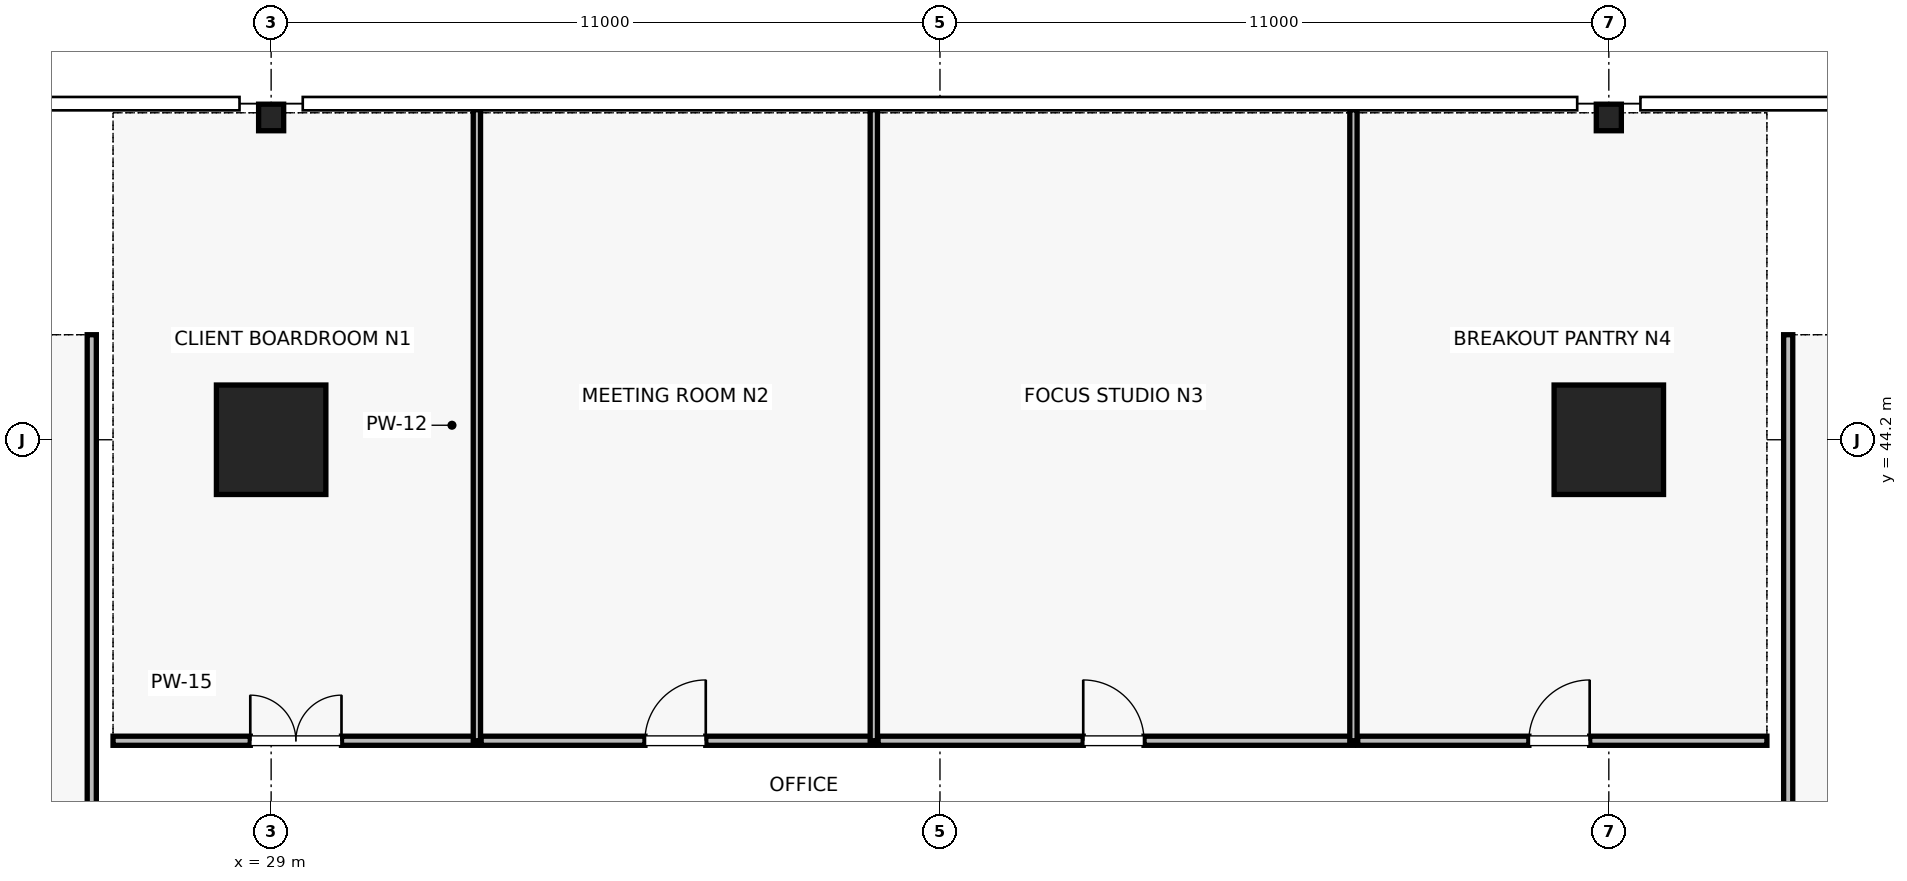
"""IFC4 building model, lengths in metres.
Left out: names, types, materials, properties, quantities, classifications, styles, units other than length and angle.
Written with IfcOpenShell. Run it as: python <this file> out.ifc"""

import sys

from ifc_helpers import new_model, si_unit, direction, frame, frame_2d, origin, origin_2d, place, context, subcontext, project, spatial, rectangle, i_section, extrude, element, fill, save


model = new_model("IFC4")
c1 = context("Model", 3, precision=1e-05, world=origin(), true_north=direction((0.0, 1.0)))
c2 = subcontext(c1, "Body", "Model", "MODEL_VIEW")
j1 = project(units=[si_unit("LENGTHUNIT", "METRE"), si_unit("PLANEANGLEUNIT", "RADIAN")], contexts=[c1])
p1 = place(None, origin())
s1 = spatial("IfcSite", under=j1, at=p1, CompositionType="ELEMENT")
p2 = place(p1, origin())
s2 = spatial("IfcBuilding", under=s1, at=p2, CompositionType="ELEMENT")
p3 = place(p2, frame((0.0, 0.0, 55.6)))
s3 = spatial("IfcBuildingStorey", under=s2, at=p3, CompositionType="ELEMENT", Elevation=55.6)
for number, where, z_axis, x_axis in (
    (1, (29.0, 44.2, 0.0), (0.0, 0.0, 1.0), (1.0, 0.0, 0.0)),
    (2, (51.0, 44.2, 0.0), (0.0, 0.0, 1.0), (1.0, 0.0, 0.0)),
):
    element("IfcColumn", number, at=place(p3, frame(where, z_axis=z_axis, x_axis=x_axis)), inside=s3, PredefinedType="COLUMN", context=c2, shape_type="SweptSolid", body=[
        extrude(rectangle(XDim=1.8, YDim=1.8, at=origin_2d()), origin(), (0.0, 0.0, 1.0), 4.0),
    ])
for number, where, z_axis, x_axis in (
    (3, (29.0, 49.5, 0.0), (0.0, 0.0, 1.0), (1.0, 0.0, 0.0)),
    (4, (51.0, 49.5, 0.0), (0.0, 0.0, 1.0), (1.0, 0.0, 0.0)),
):
    element("IfcColumn", number, at=place(p3, frame(where, z_axis=z_axis, x_axis=x_axis)), inside=s3, PredefinedType="COLUMN", context=c2, shape_type="SweptSolid", body=[
        extrude(i_section(OverallWidth=0.412, OverallDepth=0.437, WebThickness=0.036, FlangeThickness=0.058, FilletRadius=0.015, at=origin_2d()), origin(), (0.0, 0.0, 1.0), 4.0),
    ])
p4 = place(p3, frame((26.4, 39.25, 0.0), z_axis=(0.0, 0.0, 1.0), x_axis=(1.0, 0.0, 0.0)))
e5 = element("IfcWall", 5, at=p4, inside=s3, PredefinedType="PARTITIONING", context=c2, shape_type="SweptSolid", body=[
    extrude(rectangle(XDim=5.984, YDim=0.15, at=frame_2d((2.992, 0.0))), origin(), (0.0, 0.0, 1.0), 2.85),
])
p5 = place(p4, frame((2.257, 0.0, 0.0)))
e6 = element("IfcOpeningElement", 6, at=p5, cuts=e5, PredefinedType="OPENING", context=c2, shape_type="SweptSolid", body=[
    extrude(rectangle(XDim=1.5, YDim=2.25, at=frame_2d((0.75, 1.125))), frame((0.0, 0.075, 0.0), z_axis=(0.0, -1.0, 0.0), x_axis=(1.0, 0.0, 0.0)), (0.0, 0.0, 1.0), 0.15),
])
p6 = place(p3, frame((32.384, 39.25, 0.0), z_axis=(0.0, 0.0, 1.0), x_axis=(0.0, 1.0, 0.0)))
e7 = element("IfcWall", 7, at=p6, inside=s3, PredefinedType="PARTITIONING", context=c2, shape_type="SweptSolid", body=[
    extrude(rectangle(XDim=10.377, YDim=0.12, at=frame_2d((5.188, 0.0))), origin(), (0.0, 0.0, 1.0), 2.39),
])
p7 = place(p3, frame((32.454, 39.25, 0.0), z_axis=(0.0, 0.0, 1.0), x_axis=(1.0, 0.0, 0.0)))
e8 = element("IfcWall", 8, at=p7, inside=s3, PredefinedType="PARTITIONING", context=c2, shape_type="SweptSolid", body=[
    extrude(rectangle(XDim=6.458, YDim=0.15, at=frame_2d((3.229, 0.0))), origin(), (0.0, 0.0, 1.0), 2.85),
])
p8 = place(p7, frame((2.694, 0.0, 0.0)))
e9 = element("IfcOpeningElement", 9, at=p8, cuts=e8, PredefinedType="OPENING", context=c2, shape_type="SweptSolid", body=[
    extrude(rectangle(XDim=1.0, YDim=2.15, at=frame_2d((0.5, 1.075))), frame((0.0, 0.075, 0.0), z_axis=(0.0, -1.0, 0.0), x_axis=(1.0, 0.0, 0.0)), (0.0, 0.0, 1.0), 0.15),
])
p9 = place(p3, frame((38.912, 39.25, 0.0), z_axis=(0.0, 0.0, 1.0), x_axis=(0.0, 1.0, 0.0)))
e10 = element("IfcWall", 10, at=p9, inside=s3, PredefinedType="PARTITIONING", context=c2, shape_type="SweptSolid", body=[
    extrude(rectangle(XDim=10.377, YDim=0.12, at=frame_2d((5.188, 0.0))), origin(), (0.0, 0.0, 1.0), 2.39),
])
p10 = place(p3, frame((38.982, 39.25, 0.0), z_axis=(0.0, 0.0, 1.0), x_axis=(1.0, 0.0, 0.0)))
e11 = element("IfcWall", 11, at=p10, inside=s3, PredefinedType="PARTITIONING", context=c2, shape_type="SweptSolid", body=[
    extrude(rectangle(XDim=7.818, YDim=0.15, at=frame_2d((3.909, 0.0))), origin(), (0.0, 0.0, 1.0), 2.85),
])
p11 = place(p10, frame((3.374, 0.0, 0.0)))
e12 = element("IfcOpeningElement", 12, at=p11, cuts=e11, PredefinedType="OPENING", context=c2, shape_type="SweptSolid", body=[
    extrude(rectangle(XDim=1.0, YDim=2.15, at=frame_2d((0.5, 1.075))), frame((0.0, 0.075, 0.0), z_axis=(0.0, -1.0, 0.0), x_axis=(1.0, 0.0, 0.0)), (0.0, 0.0, 1.0), 0.15),
])
p12 = place(p3, frame((46.8, 39.25, 0.0), z_axis=(0.0, 0.0, 1.0), x_axis=(0.0, 1.0, 0.0)))
e13 = element("IfcWall", 13, at=p12, inside=s3, PredefinedType="PARTITIONING", context=c2, shape_type="SweptSolid", body=[
    extrude(rectangle(XDim=10.377, YDim=0.12, at=frame_2d((5.188, 0.0))), origin(), (0.0, 0.0, 1.0), 2.39),
])
p13 = place(p3, frame((46.87, 39.25, 0.0), z_axis=(0.0, 0.0, 1.0), x_axis=(1.0, 0.0, 0.0)))
e14 = element("IfcWall", 14, at=p13, inside=s3, PredefinedType="PARTITIONING", context=c2, shape_type="SweptSolid", body=[
    extrude(rectangle(XDim=6.73, YDim=0.15, at=frame_2d((3.365, 0.0))), origin(), (0.0, 0.0, 1.0), 2.85),
])
p14 = place(p13, frame((2.815, 0.0, 0.0)))
e15 = element("IfcOpeningElement", 15, at=p14, cuts=e14, PredefinedType="OPENING", context=c2, shape_type="SweptSolid", body=[
    extrude(rectangle(XDim=1.0, YDim=2.15, at=frame_2d((0.5, 1.075))), frame((0.0, 0.075, 0.0), z_axis=(0.0, -1.0, 0.0), x_axis=(1.0, 0.0, 0.0)), (0.0, 0.0, 1.0), 0.15),
])
p15 = place(p3, frame((26.05, 30.518, 0.0), z_axis=(0.0, 0.0, 1.0), x_axis=(0.0, 1.0, 0.0)))
e16 = element("IfcWall", 16, at=p15, inside=s3, PredefinedType="PARTITIONING", context=c2, shape_type="SweptSolid", body=[
    extrude(rectangle(XDim=15.409, YDim=0.15, at=frame_2d((7.705, 0.0))), origin(), (0.0, 0.0, 1.0), 2.85),
])
p16 = place(p15, frame((2.416, 0.0, 0.0)))
e17 = element("IfcOpeningElement", 17, at=p16, cuts=e16, PredefinedType="OPENING", context=c2, shape_type="SweptSolid", body=[
    extrude(rectangle(XDim=1.05, YDim=2.2, at=frame_2d((0.525, 1.1))), frame((0.0, 0.075, 0.0), z_axis=(0.0, -1.0, 0.0), x_axis=(1.0, 0.0, 0.0)), (0.0, 0.0, 1.0), 0.15),
])
p17 = place(p3, frame((53.95, 31.992, 0.0), z_axis=(0.0, 0.0, 1.0), x_axis=(0.0, 1.0, 0.0)))
e18 = element("IfcWall", 18, at=p17, inside=s3, PredefinedType="PARTITIONING", context=c2, shape_type="SweptSolid", body=[
    extrude(rectangle(XDim=13.935, YDim=0.15, at=frame_2d((6.967, 0.0))), origin(), (0.0, 0.0, 1.0), 2.85),
])
p18 = place(p17, frame((1.704, 0.0, 0.0)))
e19 = element("IfcOpeningElement", 19, at=p18, cuts=e18, PredefinedType="OPENING", context=c2, shape_type="SweptSolid", body=[
    extrude(rectangle(XDim=1.0, YDim=2.15, at=frame_2d((0.5, 1.075))), frame((0.0, 0.075, 0.0), z_axis=(0.0, -1.0, 0.0), x_axis=(1.0, 0.0, 0.0)), (0.0, 0.0, 1.0), 0.15),
])
p19 = place(p5, origin())
e20 = element("IfcDoor", 20, at=p19, inside=s3, OperationType="DOUBLE_DOOR_SINGLE_SWING", PredefinedType="DOOR", context=c2, shape_type="SweptSolid", body=[
    extrude(rectangle(XDim=1.5, YDim=2.25, at=frame_2d((0.75, 1.125))), frame((0.0, 0.025, 0.0), z_axis=(0.0, -1.0, 0.0), x_axis=(1.0, 0.0, 0.0)), (0.0, 0.0, 1.0), 0.05),
])
fill(e6, e20)
p20 = place(p8, origin())
e21 = element("IfcDoor", 21, at=p20, inside=s3, OperationType="SINGLE_SWING_RIGHT", PredefinedType="DOOR", context=c2, shape_type="SweptSolid", body=[
    extrude(rectangle(XDim=1.0, YDim=2.15, at=frame_2d((0.5, 1.075))), frame((0.0, 0.025, 0.0), z_axis=(0.0, -1.0, 0.0), x_axis=(1.0, 0.0, 0.0)), (0.0, 0.0, 1.0), 0.05),
])
fill(e9, e21)
p21 = place(p11, origin())
e22 = element("IfcDoor", 22, at=p21, inside=s3, OperationType="SINGLE_SWING_LEFT", PredefinedType="DOOR", context=c2, shape_type="SweptSolid", body=[
    extrude(rectangle(XDim=1.0, YDim=2.15, at=frame_2d((0.5, 1.075))), frame((0.0, 0.025, 0.0), z_axis=(0.0, -1.0, 0.0), x_axis=(1.0, 0.0, 0.0)), (0.0, 0.0, 1.0), 0.05),
])
fill(e12, e22)
p22 = place(p14, origin())
e23 = element("IfcDoor", 23, at=p22, inside=s3, OperationType="SINGLE_SWING_RIGHT", PredefinedType="DOOR", context=c2, shape_type="SweptSolid", body=[
    extrude(rectangle(XDim=1.0, YDim=2.15, at=frame_2d((0.5, 1.075))), frame((0.0, 0.025, 0.0), z_axis=(0.0, -1.0, 0.0), x_axis=(1.0, 0.0, 0.0)), (0.0, 0.0, 1.0), 0.05),
])
fill(e15, e23)
save(model, sys.argv[1])
